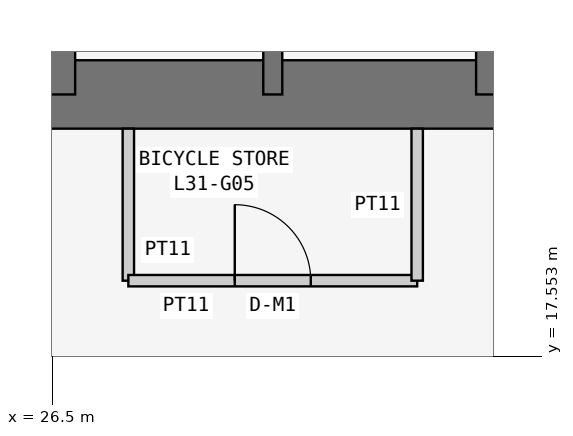
"""IFC4 building model, lengths in metres.
Left out: names, types, materials, properties, quantities, classifications, styles, units other than length and angle.
Written with IfcOpenShell. Run it as: python <this file> out.ifc"""

import sys

from ifc_helpers import new_model, si_unit, direction, frame, frame_2d, origin, place, context, subcontext, project, spatial, rectangle, extrude, element, fill, save


model = new_model("IFC4")
c1 = context("Model", 3, precision=1e-05, world=origin(), true_north=direction((0.0, 1.0)))
c2 = subcontext(c1, "Body", "Model", "MODEL_VIEW")
j1 = project(units=[si_unit("LENGTHUNIT", "METRE"), si_unit("PLANEANGLEUNIT", "RADIAN")], contexts=[c1])
p1 = place(None, origin())
s1 = spatial("IfcSite", under=j1, at=p1, CompositionType="ELEMENT")
p2 = place(p1, origin())
s2 = spatial("IfcBuilding", under=s1, at=p2, CompositionType="ELEMENT")
p3 = place(p2, frame((0.0, 0.0, 123.3)))
s3 = spatial("IfcBuildingStorey", under=s2, at=p3, CompositionType="ELEMENT", Elevation=123.3)
p4 = place(p3, frame((21.0, 21.0, 0.0), z_axis=(0.0, 0.0, 1.0), x_axis=(1.0, 0.0, 0.0)))
e1 = element("IfcWall", 1, at=p4, inside=s3, PredefinedType="SHEAR", context=c2, shape_type="SweptSolid", body=[
    extrude(rectangle(XDim=17.25, YDim=0.9, at=frame_2d((8.625, 0.0))), origin(), (0.0, 0.0, 1.0), 3.6),
])
p5 = place(p3, frame((26.6, 21.0, 0.0), z_axis=(0.0, 0.0, 1.0), x_axis=(0.0, 1.0, 0.0)))
e2 = element("IfcWall", 2, at=p5, inside=s3, PredefinedType="SHEAR", context=c2, shape_type="SweptSolid", body=[
    extrude(rectangle(XDim=16.8, YDim=0.4, at=frame_2d((8.4, 0.0))), origin(), (0.0, 0.0, 1.0), 3.6),
])
p6 = place(p5, frame((10.4, 0.0, 0.0)))
e3 = element("IfcOpeningElement", 3, at=p6, cuts=e2, PredefinedType="OPENING", context=c2, shape_type="SweptSolid", body=[
    extrude(rectangle(XDim=1.2, YDim=2.1, at=frame_2d((0.6, 1.05))), frame((0.0, 0.21, 0.0), z_axis=(0.0, -1.0, 0.0), x_axis=(1.0, 0.0, 0.0)), (0.0, 0.0, 1.0), 0.42),
])
for number, where, z_axis, x_axis in (
    (4, (29.4, 21.0, 0.0), (0.0, 0.0, 1.0), (0.0, 1.0, 0.0)),
    (5, (32.2, 21.0, 0.0), (0.0, 0.0, 1.0), (0.0, 1.0, 0.0)),
):
    element("IfcWall", number, at=place(p3, frame(where, z_axis=z_axis, x_axis=x_axis)), inside=s3, PredefinedType="SHEAR", context=c2, shape_type="SweptSolid", body=[
        extrude(rectangle(XDim=3.2, YDim=0.25, at=frame_2d((1.6, 0.0))), origin(), (0.0, 0.0, 1.0), 3.6),
    ])
p7 = place(p3, frame((27.5, 20.55, 0.0), z_axis=(0.0, 0.0, 1.0), x_axis=(0.0, -1.0, 0.0)))
e6 = element("IfcWall", 6, at=p7, inside=s3, PredefinedType="PARTITIONING", context=c2, shape_type="SweptSolid", body=[
    extrude(rectangle(XDim=2.0, YDim=0.15, at=frame_2d((1.0, 0.0))), origin(), (0.0, 0.0, 1.0), 3.45),
])
p8 = place(p3, frame((27.5, 18.55, 0.0), z_axis=(0.0, 0.0, 1.0), x_axis=(1.0, 0.0, 0.0)))
e7 = element("IfcWall", 7, at=p8, inside=s3, PredefinedType="PARTITIONING", context=c2, shape_type="SweptSolid", body=[
    extrude(rectangle(XDim=3.8, YDim=0.15, at=frame_2d((1.9, 0.0))), origin(), (0.0, 0.0, 1.0), 3.45),
])
p9 = place(p8, frame((1.4, 0.0, 0.0)))
e8 = element("IfcOpeningElement", 8, at=p9, cuts=e7, PredefinedType="OPENING", context=c2, shape_type="SweptSolid", body=[
    extrude(rectangle(XDim=1.0, YDim=2.1, at=frame_2d((0.5, 1.05))), frame((0.0, 0.085, 0.0), z_axis=(0.0, -1.0, 0.0), x_axis=(1.0, 0.0, 0.0)), (0.0, 0.0, 1.0), 0.17),
])
p10 = place(p3, frame((31.3, 18.55, 0.0), z_axis=(0.0, 0.0, 1.0), x_axis=(0.0, 1.0, 0.0)))
e9 = element("IfcWall", 9, at=p10, inside=s3, PredefinedType="PARTITIONING", context=c2, shape_type="SweptSolid", body=[
    extrude(rectangle(XDim=2.0, YDim=0.15, at=frame_2d((1.0, 0.0))), origin(), (0.0, 0.0, 1.0), 3.45),
])
p11 = place(p9, origin())
e10 = element("IfcDoor", 10, at=p11, inside=s3, OperationType="SINGLE_SWING_LEFT", PredefinedType="DOOR", context=c2, shape_type="SweptSolid", body=[
    extrude(rectangle(XDim=1.0, YDim=2.1, at=frame_2d((0.5, 1.05))), frame((0.0, 0.025, 0.0), z_axis=(0.0, -1.0, 0.0), x_axis=(1.0, 0.0, 0.0)), (0.0, 0.0, 1.0), 0.05),
])
fill(e8, e10)
save(model, sys.argv[1])
